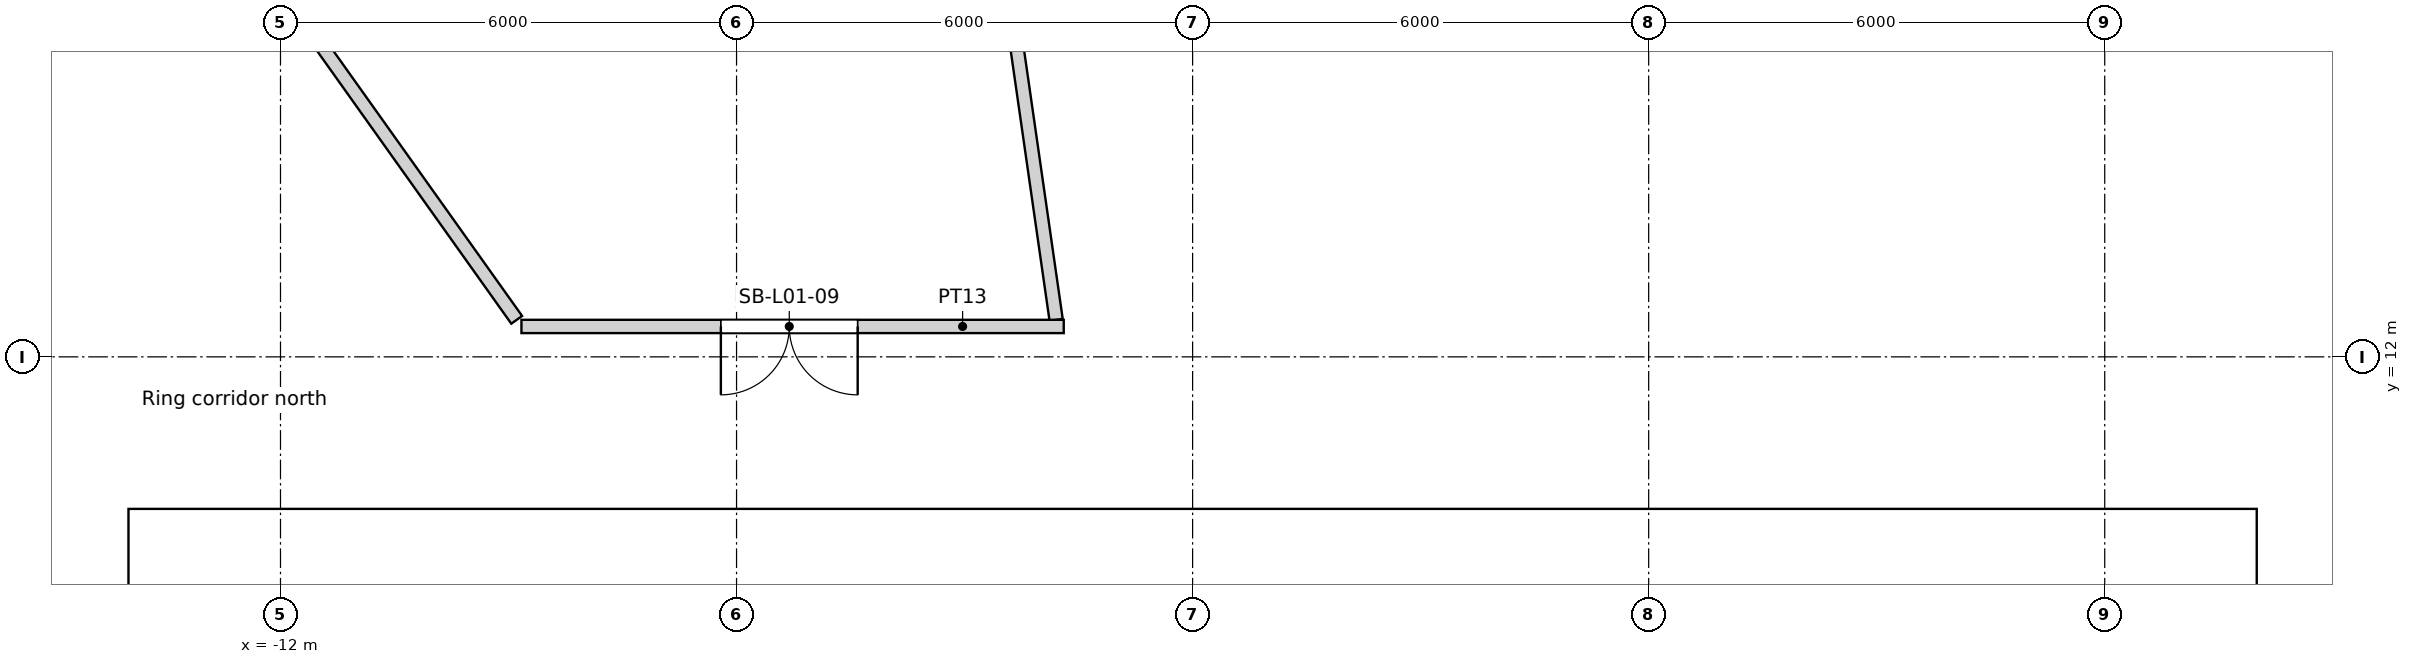
"""IFC4 building model, lengths in metres.
Left out: names, types, materials, properties, quantities, classifications, styles, units other than length and angle.
Written with IfcOpenShell. Run it as: python <this file> out.ifc"""

import sys

from ifc_helpers import new_model, si_unit, direction, frame, frame_2d, origin, origin_2d, place, context, subcontext, project, spatial, rectangle, circle, extrude, element, fill, save


model = new_model("IFC4")
c1 = context("Model", 3, precision=1e-05, world=origin(), true_north=direction((0.0, 1.0)))
c2 = subcontext(c1, "Body", "Model", "MODEL_VIEW")
j1 = project(units=[si_unit("LENGTHUNIT", "METRE"), si_unit("PLANEANGLEUNIT", "RADIAN")], contexts=[c1])
p1 = place(None, origin())
s1 = spatial("IfcSite", under=j1, at=p1, CompositionType="ELEMENT")
p2 = place(p1, origin())
s2 = spatial("IfcBuilding", under=s1, at=p2, CompositionType="ELEMENT")
p3 = place(p2, frame((0.0, 0.0, 9.0)))
s3 = spatial("IfcBuildingStorey", under=s2, at=p3, CompositionType="ELEMENT", Elevation=9.0)
for number, where, z_axis, x_axis in (
    (1, (15.552, 10.603, 0.0), (0.0, 0.0, 1.0), (1.0, 0.0, 0.0)),
    (2, (11.735, 14.716, 0.0), (0.0, 0.0, 1.0), (1.0, 0.0, 0.0)),
    (3, (-9.411, 16.301, 0.0), (0.0, 0.0, 1.0), (1.0, 0.0, 0.0)),
    (4, (-13.798, 12.802, 0.0), (0.0, 0.0, 1.0), (1.0, 0.0, 0.0)),
):
    element("IfcColumn", number, at=place(p3, frame(where, z_axis=z_axis, x_axis=x_axis)), inside=s3, PredefinedType="COLUMN", context=c2, shape_type="SweptSolid", body=[
        extrude(circle(Radius=0.8, at=origin_2d()), origin(), (0.0, 0.0, 1.0), 4.8),
    ])
p4 = place(p3, frame((-14.0, 9.4, 0.0), z_axis=(0.0, 0.0, 1.0), x_axis=(1.0, 0.0, 0.0)))
e5 = element("IfcWall", 5, at=p4, inside=s3, PredefinedType="SOLIDWALL", context=c2, shape_type="SweptSolid", body=[
    extrude(rectangle(XDim=28.0, YDim=1.2, at=frame_2d((14.0, 0.0))), origin(), (0.0, 0.0, 1.0), 4.8),
])
p5 = place(p4, frame((9.8, 0.0, 0.0)))
e6 = element("IfcOpeningElement", 6, at=p5, cuts=e5, PredefinedType="OPENING", context=c2, shape_type="SweptSolid", body=[
    extrude(rectangle(XDim=1.8, YDim=2.1, at=frame_2d((0.9, 1.05))), frame((0.0, 0.6, 0.0), z_axis=(0.0, -1.0, 0.0), x_axis=(1.0, 0.0, 0.0)), (0.0, 0.0, 1.0), 1.2),
])
p6 = place(p3, frame((-18.112, 25.435, 0.0), z_axis=(0.0, 0.0, 1.0), x_axis=(0.580054828861, -0.814577433713, 0.0)))
e7 = element("IfcWall", 7, at=p6, inside=s3, PredefinedType="PARTITIONING", context=c2, shape_type="SweptSolid", body=[
    extrude(rectangle(XDim=15.894, YDim=0.175, at=frame_2d((7.947, 0.0))), origin(), (0.0, 0.0, 1.0), 3.75),
])
p7 = place(p3, frame((-4.444, 30.906, 0.0), z_axis=(0.0, 0.0, 1.0), x_axis=(0.142304751751, -0.989822892051, 0.0)))
e8 = element("IfcWall", 8, at=p7, inside=s3, PredefinedType="PARTITIONING", context=c2, shape_type="SweptSolid", body=[
    extrude(rectangle(XDim=18.609, YDim=0.175, at=frame_2d((9.305, 0.0))), origin(), (0.0, 0.0, 1.0), 3.75),
])
p8 = place(p3, frame((-8.83, 12.4, 0.0), z_axis=(0.0, 0.0, 1.0), x_axis=(1.0, 0.0, 0.0)))
e9 = element("IfcWall", 9, at=p8, inside=s3, PredefinedType="PARTITIONING", context=c2, shape_type="SweptSolid", body=[
    extrude(rectangle(XDim=7.135, YDim=0.175, at=frame_2d((3.567, 0.0))), origin(), (0.0, 0.0, 1.0), 3.75),
])
p9 = place(p8, frame((2.624, 0.0, 0.0)))
e10 = element("IfcOpeningElement", 10, at=p9, cuts=e9, PredefinedType="OPENING", context=c2, shape_type="SweptSolid", body=[
    extrude(rectangle(XDim=1.8, YDim=2.4, at=frame_2d((0.9, 1.2))), frame((0.0, 0.087, 0.0), z_axis=(0.0, -1.0, 0.0), x_axis=(1.0, 0.0, 0.0)), (0.0, 0.0, 1.0), 0.175),
])
p10 = place(p5, origin())
e11 = element("IfcDoor", 11, at=p10, inside=s3, OperationType="DOUBLE_DOOR_SINGLE_SWING", PredefinedType="DOOR", context=c2, shape_type="SweptSolid", body=[
    extrude(rectangle(XDim=1.8, YDim=2.1, at=frame_2d((0.9, 1.05))), frame((0.0, 0.025, 0.0), z_axis=(0.0, -1.0, 0.0), x_axis=(1.0, 0.0, 0.0)), (0.0, 0.0, 1.0), 0.05),
])
fill(e6, e11)
p11 = place(p9, origin())
e12 = element("IfcDoor", 12, at=p11, inside=s3, OperationType="DOUBLE_DOOR_SINGLE_SWING", PredefinedType="DOOR", context=c2, shape_type="SweptSolid", body=[
    extrude(rectangle(XDim=1.8, YDim=2.4, at=frame_2d((0.9, 1.2))), frame((0.0, 0.025, 0.0), z_axis=(0.0, -1.0, 0.0), x_axis=(1.0, 0.0, 0.0)), (0.0, 0.0, 1.0), 0.05),
])
fill(e10, e12)
save(model, sys.argv[1])
